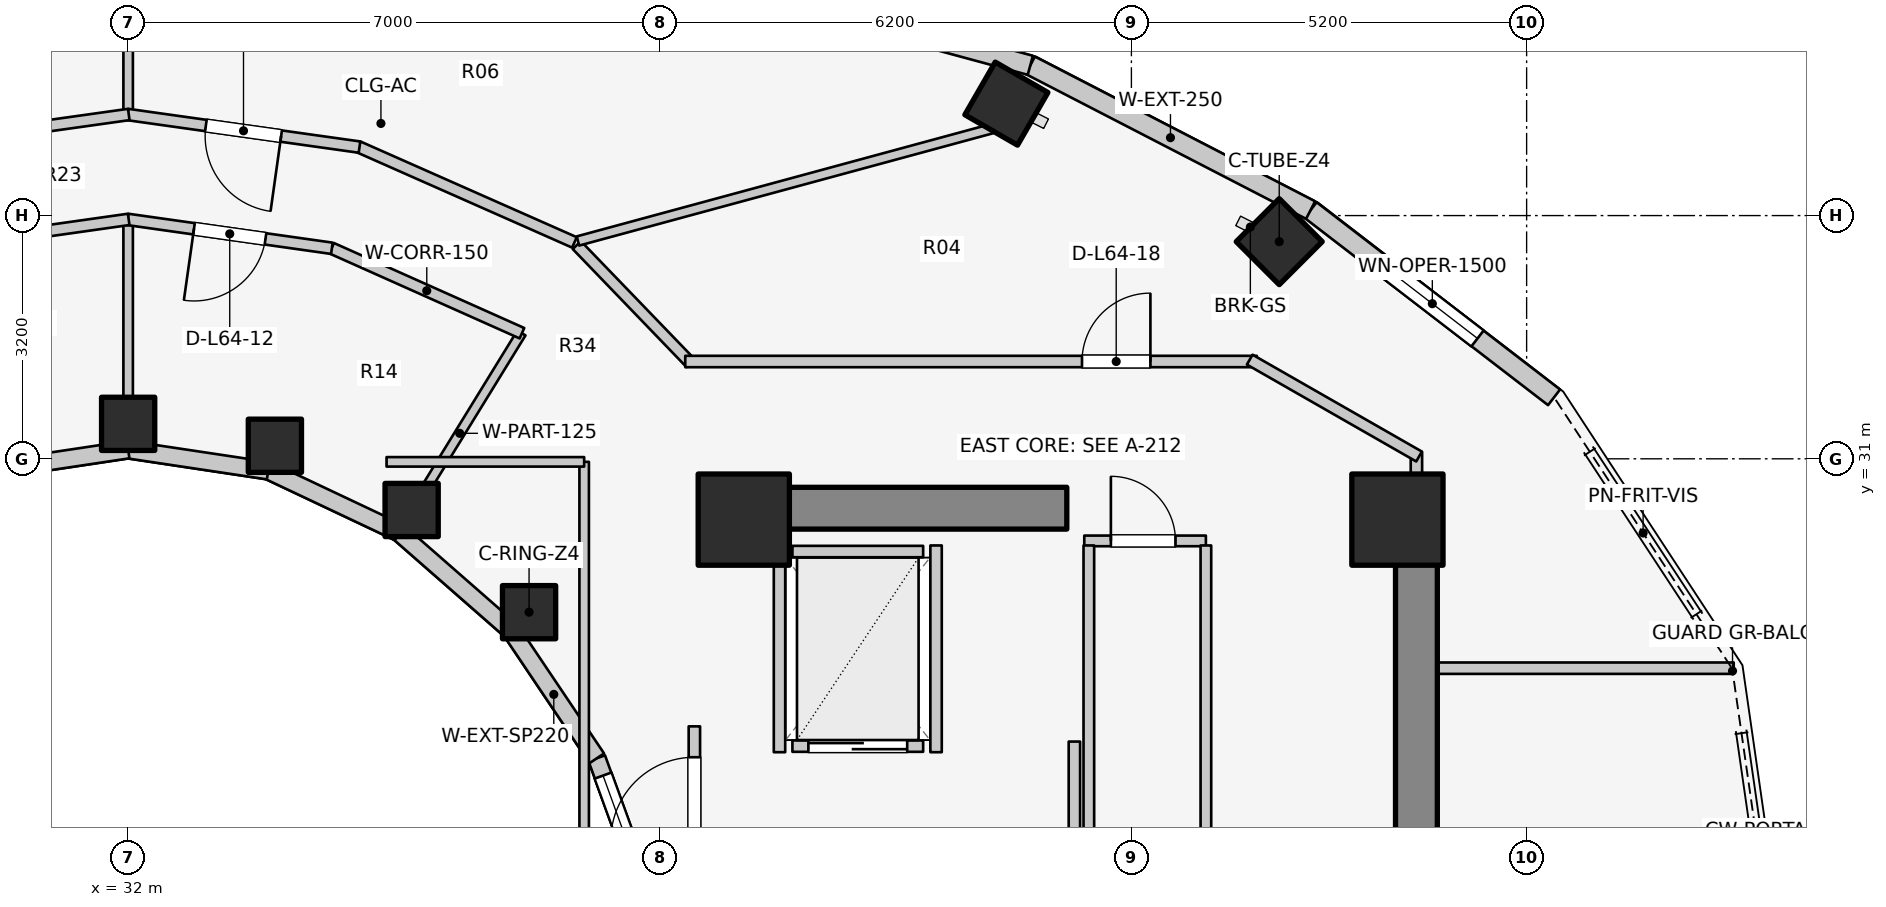
"""IFC4 building model, lengths in metres.
Left out: names, types, materials, properties, quantities, classifications, styles, units other than length and angle.
Written with IfcOpenShell. Run it as: python <this file> out.ifc"""

import sys

from ifc_helpers import new_model, si_unit, direction, frame, frame_2d, origin, origin_2d, place, context, subcontext, project, spatial, rectangle, extrude, element, fill, save


model = new_model("IFC4")
c1 = context("Model", 3, precision=1e-05, world=origin(), true_north=direction((0.0, 1.0)))
c2 = subcontext(c1, "Body", "Model", "MODEL_VIEW")
j1 = project(units=[si_unit("LENGTHUNIT", "METRE"), si_unit("PLANEANGLEUNIT", "RADIAN")], contexts=[c1])
p1 = place(None, origin())
s1 = spatial("IfcSite", under=j1, at=p1, CompositionType="ELEMENT")
p2 = place(p1, origin())
s2 = spatial("IfcBuilding", under=s1, at=p2, CompositionType="ELEMENT")
p3 = place(p2, frame((0.0, 0.0, 210.9)))
s3 = spatial("IfcBuildingStorey", under=s2, at=p3, CompositionType="ELEMENT", Elevation=210.9)
p4 = place(p3, frame((48.95, 17.05, 0.0), z_axis=(0.0, 0.0, 1.0), x_axis=(0.0, 1.0, 0.0)))
e1 = element("IfcWall", 1, at=p4, inside=s3, PredefinedType="SHEAR", context=c2, shape_type="SweptSolid", body=[
    extrude(rectangle(XDim=12.8, YDim=0.55, at=frame_2d((6.4, 0.0))), origin(), (0.0, 0.0, 1.0), 3.1),
])
p5 = place(p3, frame((39.85, 30.35, 0.0), z_axis=(0.0, 0.0, 1.0), x_axis=(1.0, 0.0, 0.0)))
e2 = element("IfcWall", 2, at=p5, inside=s3, PredefinedType="SHEAR", context=c2, shape_type="SweptSolid", body=[
    extrude(rectangle(XDim=4.5, YDim=0.55, at=frame_2d((2.25, 0.0))), origin(), (0.0, 0.0, 1.0), 3.1),
])
for number, where, z_axis, x_axis in (
    (3, (48.7, 30.2, 0.0), (0.0, 0.0, 1.0), (1.0, 0.0, 0.0)),
    (4, (40.1, 30.2, 0.0), (0.0, 0.0, 1.0), (1.0, 0.0, 0.0)),
):
    element("IfcColumn", number, at=place(p3, frame(where, z_axis=z_axis, x_axis=x_axis)), inside=s3, PredefinedType="COLUMN", context=c2, shape_type="SweptSolid", body=[
        extrude(rectangle(XDim=1.2, YDim=1.2, at=origin_2d()), origin(), (0.0, 0.0, 1.0), 3.1),
    ])
p6 = place(p3, frame((37.275, 28.982, 0.0), z_axis=(0.0, 0.0, 1.0), x_axis=(1.0, 0.0, 0.0)))
e5 = element("IfcColumn", 5, at=p6, inside=s3, PredefinedType="COLUMN", context=c2, shape_type="SweptSolid", body=[
    extrude(rectangle(XDim=0.7, YDim=0.7, at=origin_2d()), origin(), (0.0, 0.0, 1.0), 3.1),
])
p7 = place(p3, frame((47.145, 33.857, 0.0), z_axis=(0.0, 0.0, 1.0), x_axis=(0.707106781187, 0.707106781187, 0.0)))
e6 = element("IfcColumn", 6, at=p7, inside=s3, PredefinedType="COLUMN", context=c2, shape_type="SweptSolid", body=[
    extrude(rectangle(XDim=0.8, YDim=0.8, at=origin_2d()), origin(), (0.0, 0.0, 1.0), 3.1),
])
p8 = place(p3, frame((35.73, 30.327, 0.0), z_axis=(0.0, 0.0, 1.0), x_axis=(1.0, 0.0, 0.0)))
e7 = element("IfcColumn", 7, at=p8, inside=s3, PredefinedType="COLUMN", context=c2, shape_type="SweptSolid", body=[
    extrude(rectangle(XDim=0.7, YDim=0.7, at=origin_2d()), origin(), (0.0, 0.0, 1.0), 3.1),
])
p9 = place(p3, frame((43.555, 35.673, 0.0), z_axis=(0.0, 0.0, 1.0), x_axis=(0.5, 0.866025403784, 0.0)))
e8 = element("IfcColumn", 8, at=p9, inside=s3, PredefinedType="COLUMN", context=c2, shape_type="SweptSolid", body=[
    extrude(rectangle(XDim=0.8, YDim=0.8, at=origin_2d()), origin(), (0.0, 0.0, 1.0), 3.1),
])
for number, where, z_axis, x_axis in (
    (9, (33.931, 31.172, 0.0), (0.0, 0.0, 1.0), (1.0, 0.0, 0.0)),
    (10, (32.0, 31.46, 0.0), (0.0, 0.0, 1.0), (1.0, 0.0, 0.0)),
):
    element("IfcColumn", number, at=place(p3, frame(where, z_axis=z_axis, x_axis=x_axis)), inside=s3, PredefinedType="COLUMN", context=c2, shape_type="SweptSolid", body=[
        extrude(rectangle(XDim=0.7, YDim=0.7, at=origin_2d()), origin(), (0.0, 0.0, 1.0), 3.1),
    ])
p10 = place(p3, frame((38.877, 25.102, 0.0), z_axis=(0.0, 0.0, 1.0), x_axis=(-0.341423187295, 0.93990968033, 0.0)))
e11 = element("IfcWall", 11, at=p10, inside=s3, PredefinedType="STANDARD", context=c2, shape_type="SweptSolid", body=[
    extrude(rectangle(XDim=2.084, YDim=0.23, at=frame_2d((1.042, 0.0))), origin(), (0.0, 0.0, 1.0), 2.84),
])
p11 = place(p10, frame((0.242, 0.0, 0.85)))
e12 = element("IfcOpeningElement", 12, at=p11, cuts=e11, PredefinedType="OPENING", context=c2, shape_type="SweptSolid", body=[
    extrude(rectangle(XDim=1.6, YDim=1.65, at=frame_2d((0.8, 0.825))), frame((0.0, 0.125, 0.0), z_axis=(0.0, -1.0, 0.0), x_axis=(1.0, 0.0, 0.0)), (0.0, 0.0, 1.0), 0.25),
])
p12 = place(p3, frame((38.166, 27.06, 0.0), z_axis=(0.0, 0.0, 1.0), x_axis=(-0.558197800898, 0.829707909492, 0.0)))
e13 = element("IfcWall", 13, at=p12, inside=s3, PredefinedType="STANDARD", context=c2, shape_type="SweptSolid", body=[
    extrude(rectangle(XDim=2.027, YDim=0.23, at=frame_2d((1.013, 0.0))), origin(), (0.0, 0.0, 1.0), 2.16),
])
p13 = place(p3, frame((37.035, 28.742, 0.0), z_axis=(0.0, 0.0, 1.0), x_axis=(-0.752576694707, 0.658504607869, 0.0)))
e14 = element("IfcWall", 14, at=p13, inside=s3, PredefinedType="STANDARD", context=c2, shape_type="SweptSolid", body=[
    extrude(rectangle(XDim=1.959, YDim=0.23, at=frame_2d((0.98, 0.0))), origin(), (0.0, 0.0, 1.0), 2.16),
])
p14 = place(p3, frame((35.56, 30.032, 0.0), z_axis=(0.0, 0.0, 1.0), x_axis=(-0.904179699603, 0.427152280606, 0.0)))
e15 = element("IfcWall", 15, at=p14, inside=s3, PredefinedType="STANDARD", context=c2, shape_type="SweptSolid", body=[
    extrude(rectangle(XDim=1.899, YDim=0.23, at=frame_2d((0.95, 0.0))), origin(), (0.0, 0.0, 1.0), 2.16),
])
for number, where, z_axis, x_axis in (
    (16, (33.843, 30.843, 0.0), (0.0, 0.0, 1.0), (-0.989, 0.149, 0.0)),
    (17, (32.0, 31.12, 0.0), (0.0, 0.0, 1.0), (-0.989, -0.149, 0.0)),
):
    element("IfcWall", number, at=place(p3, frame(where, z_axis=z_axis, x_axis=x_axis)), inside=s3, PredefinedType="STANDARD", context=c2, shape_type="SweptSolid", body=[
        extrude(rectangle(XDim=1.864, YDim=0.23, at=frame_2d((0.932, 0.0))), origin(), (0.0, 0.0, 1.0), 2.16),
    ])
p15 = place(p3, frame((50.761, 31.809, 0.0), z_axis=(0.0, 0.0, 1.0), x_axis=(-0.792713817907, 0.609593965603, 0.0)))
e18 = element("IfcWall", 18, at=p15, inside=s3, PredefinedType="STANDARD", context=c2, shape_type="SweptSolid", body=[
    extrude(rectangle(XDim=4.041, YDim=0.26, at=frame_2d((2.021, 0.0))), origin(), (0.0, 0.0, 1.0), 2.85),
])
p16 = place(p15, frame((1.271, 0.0, 0.75)))
e19 = element("IfcOpeningElement", 19, at=p16, cuts=e18, PredefinedType="OPENING", context=c2, shape_type="SweptSolid", body=[
    extrude(rectangle(XDim=1.5, YDim=1.6, at=frame_2d((0.75, 0.8))), frame((0.0, 0.14, 0.0), z_axis=(0.0, -1.0, 0.0), x_axis=(1.0, 0.0, 0.0)), (0.0, 0.0, 1.0), 0.28),
])
p17 = place(p3, frame((47.558, 34.272, 0.0), z_axis=(0.0, 0.0, 1.0), x_axis=(-0.88849146803, 0.458893137057, 0.0)))
e20 = element("IfcWall", 20, at=p17, inside=s3, PredefinedType="STANDARD", context=c2, shape_type="SweptSolid", body=[
    extrude(rectangle(XDim=4.15, YDim=0.26, at=frame_2d((2.075, 0.0))), origin(), (0.0, 0.0, 1.0), 2.85),
])
p18 = place(p3, frame((43.87, 36.177, 0.0), z_axis=(0.0, 0.0, 1.0), x_axis=(-0.965213026382, 0.261464746576, 0.0)))
e21 = element("IfcWall", 21, at=p18, inside=s3, PredefinedType="STANDARD", context=c2, shape_type="SweptSolid", body=[
    extrude(rectangle(XDim=5.001, YDim=0.26, at=frame_2d((2.5, 0.0))), origin(), (0.0, 0.0, 1.0), 2.85),
])
p19 = place(p18, frame((1.75, 0.0, 0.75)))
e22 = element("IfcOpeningElement", 22, at=p19, cuts=e21, PredefinedType="OPENING", context=c2, shape_type="SweptSolid", body=[
    extrude(rectangle(XDim=1.5, YDim=1.6, at=frame_2d((0.75, 0.8))), frame((0.0, 0.14, 0.0), z_axis=(0.0, -1.0, 0.0), x_axis=(1.0, 0.0, 0.0)), (0.0, 0.0, 1.0), 0.28),
])
p20 = place(p3, frame((40.74, 27.22, 0.0), z_axis=(0.0, 0.0, 1.0), x_axis=(1.0, 0.0, 0.0)))
e23 = element("IfcWall", 23, at=p20, inside=s3, PredefinedType="SOLIDWALL", context=c2, shape_type="SweptSolid", body=[
    extrude(rectangle(XDim=1.72, YDim=0.15, at=frame_2d((0.86, 0.0))), origin(), (0.0, 0.0, 1.0), 2.855),
])
p21 = place(p20, frame((0.21, 0.0, 0.0)))
e24 = element("IfcOpeningElement", 24, at=p21, cuts=e23, PredefinedType="OPENING", context=c2, shape_type="SweptSolid", body=[
    extrude(rectangle(XDim=1.3, YDim=2.1, at=frame_2d((0.65, 1.05))), frame((0.0, 0.085, 0.0), z_axis=(0.0, -1.0, 0.0), x_axis=(1.0, 0.0, 0.0)), (0.0, 0.0, 1.0), 0.17),
])
p22 = place(p3, frame((40.74, 29.78, 0.0), z_axis=(0.0, 0.0, 1.0), x_axis=(1.0, 0.0, 0.0)))
e25 = element("IfcWall", 25, at=p22, inside=s3, PredefinedType="SOLIDWALL", context=c2, shape_type="SweptSolid", body=[
    extrude(rectangle(XDim=1.72, YDim=0.15, at=frame_2d((0.86, 0.0))), origin(), (0.0, 0.0, 1.0), 2.855),
])
for number, where, z_axis, x_axis in (
    (26, (40.57, 27.14, 0.0), (0.0, 0.0, 1.0), (0.0, 1.0, 0.0)),
    (27, (42.63, 27.14, 0.0), (0.0, 0.0, 1.0), (0.0, 1.0, 0.0)),
):
    element("IfcWall", number, at=place(p3, frame(where, z_axis=z_axis, x_axis=x_axis)), inside=s3, PredefinedType="SOLIDWALL", context=c2, shape_type="SweptSolid", body=[
        extrude(rectangle(XDim=2.72, YDim=0.15, at=frame_2d((1.36, 0.0))), origin(), (0.0, 0.0, 1.0), 2.855),
    ])
p23 = place(p3, frame((44.45, 24.08, 0.0), z_axis=(0.0, 0.0, 1.0), x_axis=(0.0, 1.0, 0.0)))
e28 = element("IfcWall", 28, at=p23, inside=s3, PredefinedType="PARTITIONING", context=c2, shape_type="SweptSolid", body=[
    extrude(rectangle(XDim=3.2, YDim=0.15, at=frame_2d((1.6, 0.0))), origin(), (0.0, 0.0, 1.0), 2.855),
])
p24 = place(p3, frame((39.45, 24.08, 0.0), z_axis=(0.0, 0.0, 1.0), x_axis=(0.0, 1.0, 0.0)))
e29 = element("IfcWall", 29, at=p24, inside=s3, PredefinedType="PARTITIONING", context=c2, shape_type="SweptSolid", body=[
    extrude(rectangle(XDim=3.4, YDim=0.15, at=frame_2d((1.7, 0.0))), origin(), (0.0, 0.0, 1.0), 2.855),
])
p25 = place(p24, frame((1.894, 0.0, 0.0)))
e30 = element("IfcOpeningElement", 30, at=p25, cuts=e29, PredefinedType="OPENING", context=c2, shape_type="SweptSolid", body=[
    extrude(rectangle(XDim=1.1, YDim=2.1, at=frame_2d((0.55, 1.05))), frame((0.0, 0.085, 0.0), z_axis=(0.0, -1.0, 0.0), x_axis=(1.0, 0.0, 0.0)), (0.0, 0.0, 1.0), 0.17),
])
p26 = place(p3, frame((44.58, 29.92, 0.0), z_axis=(0.0, 0.0, 1.0), x_axis=(1.0, 0.0, 0.0)))
e31 = element("IfcWall", 31, at=p26, inside=s3, PredefinedType="PLUMBINGWALL", context=c2, shape_type="SweptSolid", body=[
    extrude(rectangle(XDim=1.6, YDim=0.14, at=frame_2d((0.8, 0.0))), origin(), (0.0, 0.0, 1.0), 2.855),
])
p27 = place(p26, frame((0.35, 0.0, 0.0)))
e32 = element("IfcOpeningElement", 32, at=p27, cuts=e31, PredefinedType="OPENING", context=c2, shape_type="SweptSolid", body=[
    extrude(rectangle(XDim=0.85, YDim=2.05, at=frame_2d((0.425, 1.025))), frame((0.0, 0.08, 0.0), z_axis=(0.0, -1.0, 0.0), x_axis=(1.0, 0.0, 0.0)), (0.0, 0.0, 1.0), 0.16),
])
for number, where, z_axis, x_axis in (
    (33, (44.64, 25.98, 0.0), (0.0, 0.0, 1.0), (0.0, 1.0, 0.0)),
    (34, (46.18, 25.98, 0.0), (0.0, 0.0, 1.0), (0.0, 1.0, 0.0)),
):
    element("IfcWall", number, at=place(p3, frame(where, z_axis=z_axis, x_axis=x_axis)), inside=s3, PredefinedType="PLUMBINGWALL", context=c2, shape_type="SweptSolid", body=[
        extrude(rectangle(XDim=3.88, YDim=0.14, at=frame_2d((1.94, 0.0))), origin(), (0.0, 0.0, 1.0), 2.855),
    ])
p28 = place(p3, frame((35.55, 30.015, 0.0), z_axis=(0.0, 0.0, 1.0), x_axis=(0.523992004803, 0.851723182086, 0.0)))
e35 = element("IfcWall", 35, at=p28, inside=s3, PredefinedType="PARTITIONING", context=c2, shape_type="SweptSolid", body=[
    extrude(rectangle(XDim=3.101, YDim=0.125, at=frame_2d((1.551, 0.0))), origin(), (0.0, 0.0, 1.0), 2.376),
])
p29 = place(p3, frame((32.0, 31.1, 0.0), z_axis=(0.0, 0.0, 1.0), x_axis=(0.0, 1.0, 0.0)))
e36 = element("IfcWall", 36, at=p29, inside=s3, PredefinedType="PARTITIONING", context=c2, shape_type="SweptSolid", body=[
    extrude(rectangle(XDim=3.05, YDim=0.125, at=frame_2d((1.525, 0.0))), origin(), (0.0, 0.0, 1.0), 2.376),
])
p30 = place(p3, frame((37.181, 32.652, 0.0), z_axis=(0.0, 0.0, 1.0), x_axis=(-0.913120130558, 0.407690602257, 0.0)))
e37 = element("IfcWall", 37, at=p30, inside=s3, PredefinedType="PARTITIONING", context=c2, shape_type="SweptSolid", body=[
    extrude(rectangle(XDim=2.743, YDim=0.15, at=frame_2d((1.371, 0.0))), origin(), (0.0, 0.0, 1.0), 2.376),
])
p31 = place(p3, frame((34.68, 33.77, 0.0), z_axis=(0.0, 0.0, 1.0), x_axis=(-0.990132151456, 0.140136799779, 0.0)))
e38 = element("IfcWall", 38, at=p31, inside=s3, PredefinedType="PARTITIONING", context=c2, shape_type="SweptSolid", body=[
    extrude(rectangle(XDim=2.714, YDim=0.15, at=frame_2d((1.357, 0.0))), origin(), (0.0, 0.0, 1.0), 2.376),
])
p32 = place(p31, frame((0.882, 0.0, 0.0)))
e39 = element("IfcOpeningElement", 39, at=p32, cuts=e38, PredefinedType="OPENING", context=c2, shape_type="SweptSolid", body=[
    extrude(rectangle(XDim=0.95, YDim=2.1, at=frame_2d((0.475, 1.05))), frame((0.0, 0.085, 0.0), z_axis=(0.0, -1.0, 0.0), x_axis=(1.0, 0.0, 0.0)), (0.0, 0.0, 1.0), 0.17),
])
p33 = place(p3, frame((32.007, 34.15, 0.0), z_axis=(0.0, 0.0, 1.0), x_axis=(-0.990132151456, -0.140136799779, 0.0)))
e40 = element("IfcWall", 40, at=p33, inside=s3, PredefinedType="PARTITIONING", context=c2, shape_type="SweptSolid", body=[
    extrude(rectangle(XDim=2.714, YDim=0.15, at=frame_2d((1.357, 0.0))), origin(), (0.0, 0.0, 1.0), 2.376),
])
p34 = place(p3, frame((38.0, 25.8, 0.0), z_axis=(0.0, 0.0, 1.0), x_axis=(0.0, 1.0, 0.0)))
e41 = element("IfcWall", 41, at=p34, inside=s3, PredefinedType="PARTITIONING", context=c2, shape_type="SweptSolid", body=[
    extrude(rectangle(XDim=5.16, YDim=0.125, at=frame_2d((2.58, 0.0))), origin(), (0.0, 0.0, 1.0), 2.232),
])
p35 = place(p3, frame((35.4, 30.96, 0.0), z_axis=(0.0, 0.0, 1.0), x_axis=(1.0, 0.0, 0.0)))
e42 = element("IfcWall", 42, at=p35, inside=s3, PredefinedType="PARTITIONING", context=c2, shape_type="SweptSolid", body=[
    extrude(rectangle(XDim=2.6, YDim=0.125, at=frame_2d((1.3, 0.0))), origin(), (0.0, 0.0, 1.0), 2.376),
])
p36 = place(p3, frame((48.95, 28.245, 0.0), z_axis=(0.0, 0.0, 1.0), x_axis=(1.0, 0.0, 0.0)))
e43 = element("IfcWall", 43, at=p36, inside=s3, PredefinedType="PARTITIONING", context=c2, shape_type="SweptSolid", body=[
    extrude(rectangle(XDim=4.175, YDim=0.15, at=frame_2d((2.087, 0.0))), origin(), (0.0, 0.0, 1.0), 2.855),
])
p37 = place(p3, frame((48.95, 29.8, 0.0), z_axis=(0.0, 0.0, 1.0), x_axis=(0.0, 1.0, 0.0)))
e44 = element("IfcWall", 44, at=p37, inside=s3, PredefinedType="PARTITIONING", context=c2, shape_type="SweptSolid", body=[
    extrude(rectangle(XDim=1.29, YDim=0.15, at=frame_2d((0.645, 0.0))), origin(), (0.0, 0.0, 1.0), 2.855),
])
p38 = place(p3, frame((37.903, 33.812, 0.0), z_axis=(0.0, 0.0, 1.0), x_axis=(0.694032962553, -0.719943224768, 0.0)))
e45 = element("IfcWall", 45, at=p38, inside=s3, PredefinedType="PARTITIONING", context=c2, shape_type="SweptSolid", body=[
    extrude(rectangle(XDim=2.158, YDim=0.15, at=frame_2d((1.079, 0.0))), origin(), (0.0, 0.0, 1.0), 2.376),
])
p39 = place(p3, frame((39.33, 32.28, 0.0), z_axis=(0.0, 0.0, 1.0), x_axis=(1.0, 0.0, 0.0)))
e46 = element("IfcWall", 46, at=p39, inside=s3, PredefinedType="PARTITIONING", context=c2, shape_type="SweptSolid", body=[
    extrude(rectangle(XDim=7.52, YDim=0.15, at=frame_2d((3.76, 0.0))), origin(), (0.0, 0.0, 1.0), 2.376),
])
p40 = place(p39, frame((5.22, 0.0, 0.0)))
e47 = element("IfcOpeningElement", 47, at=p40, cuts=e46, PredefinedType="OPENING", context=c2, shape_type="SweptSolid", body=[
    extrude(rectangle(XDim=0.9, YDim=2.1, at=frame_2d((0.45, 1.05))), frame((0.0, 0.085, 0.0), z_axis=(0.0, -1.0, 0.0), x_axis=(1.0, 0.0, 0.0)), (0.0, 0.0, 1.0), 0.17),
])
p41 = place(p3, frame((46.757, 32.305, 0.0), z_axis=(0.0, 0.0, 1.0), x_axis=(0.867991349648, -0.496579315857, 0.0)))
e48 = element("IfcWall", 48, at=p41, inside=s3, PredefinedType="PARTITIONING", context=c2, shape_type="SweptSolid", body=[
    extrude(rectangle(XDim=2.567, YDim=0.15, at=frame_2d((1.283, 0.0))), origin(), (0.0, 0.0, 1.0), 2.22),
])
p42 = place(p3, frame((37.918, 33.866, 0.0), z_axis=(0.0, 0.0, 1.0), x_axis=(0.965109390289, 0.261847025523, 0.0)))
e49 = element("IfcWall", 49, at=p42, inside=s3, PredefinedType="PARTITIONING", context=c2, shape_type="SweptSolid", body=[
    extrude(rectangle(XDim=5.644, YDim=0.125, at=frame_2d((2.822, 0.0))), origin(), (0.0, 0.0, 1.0), 2.376),
])
p43 = place(p3, frame((32.0, 35.585, 0.0), z_axis=(0.0, 0.0, 1.0), x_axis=(0.0, 1.0, 0.0)))
e50 = element("IfcWall", 50, at=p43, inside=s3, PredefinedType="PARTITIONING", context=c2, shape_type="SweptSolid", body=[
    extrude(rectangle(XDim=1.315, YDim=0.125, at=frame_2d((0.657, 0.0))), origin(), (0.0, 0.0, 1.0), 2.376),
])
p44 = place(p3, frame((37.872, 33.847, 0.0), z_axis=(0.0, 0.0, 1.0), x_axis=(-0.914490094652, 0.40460828808, 0.0)))
e51 = element("IfcWall", 51, at=p44, inside=s3, PredefinedType="PARTITIONING", context=c2, shape_type="SweptSolid", body=[
    extrude(rectangle(XDim=3.11, YDim=0.15, at=frame_2d((1.555, 0.0))), origin(), (0.0, 0.0, 1.0), 2.376),
])
p45 = place(p3, frame((35.044, 35.101, 0.0), z_axis=(0.0, 0.0, 1.0), x_axis=(-0.990257602807, 0.139247549651, 0.0)))
e52 = element("IfcWall", 52, at=p45, inside=s3, PredefinedType="PARTITIONING", context=c2, shape_type="SweptSolid", body=[
    extrude(rectangle(XDim=3.082, YDim=0.15, at=frame_2d((1.541, 0.0))), origin(), (0.0, 0.0, 1.0), 2.376),
])
p46 = place(p45, frame((1.041, 0.0, 0.0)))
e53 = element("IfcOpeningElement", 53, at=p46, cuts=e52, PredefinedType="OPENING", context=c2, shape_type="SweptSolid", body=[
    extrude(rectangle(XDim=1.0, YDim=2.1, at=frame_2d((0.5, 1.05))), frame((0.0, 0.085, 0.0), z_axis=(0.0, -1.0, 0.0), x_axis=(1.0, 0.0, 0.0)), (0.0, 0.0, 1.0), 0.17),
])
p47 = place(p3, frame((32.008, 35.53, 0.0), z_axis=(0.0, 0.0, 1.0), x_axis=(-0.990257602807, -0.139247549651, 0.0)))
e54 = element("IfcWall", 54, at=p47, inside=s3, PredefinedType="PARTITIONING", context=c2, shape_type="SweptSolid", body=[
    extrude(rectangle(XDim=3.082, YDim=0.15, at=frame_2d((1.541, 0.0))), origin(), (0.0, 0.0, 1.0), 2.376),
])
p48 = place(p11, origin())
e55 = element("IfcWindow", 55, at=p48, inside=s3, PartitioningType="SINGLE_PANEL", PredefinedType="WINDOW", context=c2, shape_type="SweptSolid", body=[
    extrude(rectangle(XDim=1.6, YDim=1.65, at=frame_2d((0.8, 0.825))), frame((0.0, 0.03, 0.0), z_axis=(0.0, -1.0, 0.0), x_axis=(1.0, 0.0, 0.0)), (0.0, 0.0, 1.0), 0.06),
])
fill(e12, e55)
p49 = place(p16, origin())
e56 = element("IfcWindow", 56, at=p49, inside=s3, PartitioningType="SINGLE_PANEL", PredefinedType="WINDOW", context=c2, shape_type="SweptSolid", body=[
    extrude(rectangle(XDim=1.5, YDim=1.6, at=frame_2d((0.75, 0.8))), frame((0.0, 0.03, 0.0), z_axis=(0.0, -1.0, 0.0), x_axis=(1.0, 0.0, 0.0)), (0.0, 0.0, 1.0), 0.06),
])
fill(e19, e56)
p50 = place(p21, origin())
e57 = element("IfcDoor", 57, at=p50, inside=s3, OperationType="DOUBLE_DOOR_SLIDING", PredefinedType="DOOR", context=c2, shape_type="SweptSolid", body=[
    extrude(rectangle(XDim=1.3, YDim=2.1, at=frame_2d((0.65, 1.05))), frame((0.0, 0.025, 0.0), z_axis=(0.0, -1.0, 0.0), x_axis=(1.0, 0.0, 0.0)), (0.0, 0.0, 1.0), 0.05),
])
fill(e24, e57)
p51 = place(p25, origin())
e58 = element("IfcDoor", 58, at=p51, inside=s3, OperationType="SINGLE_SWING_LEFT", PredefinedType="DOOR", context=c2, shape_type="SweptSolid", body=[
    extrude(rectangle(XDim=1.1, YDim=2.1, at=frame_2d((0.55, 1.05))), frame((0.0, 0.025, 0.0), z_axis=(0.0, -1.0, 0.0), x_axis=(1.0, 0.0, 0.0)), (0.0, 0.0, 1.0), 0.05),
])
fill(e30, e58)
p52 = place(p27, origin())
e59 = element("IfcDoor", 59, at=p52, inside=s3, OperationType="SINGLE_SWING_LEFT", PredefinedType="DOOR", context=c2, shape_type="SweptSolid", body=[
    extrude(rectangle(XDim=0.85, YDim=2.05, at=frame_2d((0.425, 1.025))), frame((0.0, 0.025, 0.0), z_axis=(0.0, -1.0, 0.0), x_axis=(1.0, 0.0, 0.0)), (0.0, 0.0, 1.0), 0.05),
])
fill(e32, e59)
p53 = place(p32, origin())
e60 = element("IfcDoor", 60, at=p53, inside=s3, OperationType="SINGLE_SWING_RIGHT", PredefinedType="DOOR", context=c2, shape_type="SweptSolid", body=[
    extrude(rectangle(XDim=0.95, YDim=2.1, at=frame_2d((0.475, 1.05))), frame((0.0, 0.025, 0.0), z_axis=(0.0, -1.0, 0.0), x_axis=(1.0, 0.0, 0.0)), (0.0, 0.0, 1.0), 0.05),
])
fill(e39, e60)
p54 = place(p40, origin())
e61 = element("IfcDoor", 61, at=p54, inside=s3, OperationType="SINGLE_SWING_RIGHT", PredefinedType="DOOR", context=c2, shape_type="SweptSolid", body=[
    extrude(rectangle(XDim=0.9, YDim=2.1, at=frame_2d((0.45, 1.05))), frame((0.0, 0.025, 0.0), z_axis=(0.0, -1.0, 0.0), x_axis=(1.0, 0.0, 0.0)), (0.0, 0.0, 1.0), 0.05),
])
fill(e47, e61)
p55 = place(p46, origin())
e62 = element("IfcDoor", 62, at=p55, inside=s3, OperationType="SINGLE_SWING_LEFT", PredefinedType="DOOR", context=c2, shape_type="SweptSolid", body=[
    extrude(rectangle(XDim=1.0, YDim=2.1, at=frame_2d((0.5, 1.05))), frame((0.0, 0.025, 0.0), z_axis=(0.0, -1.0, 0.0), x_axis=(1.0, 0.0, 0.0)), (0.0, 0.0, 1.0), 0.05),
])
fill(e53, e62)
save(model, sys.argv[1])
